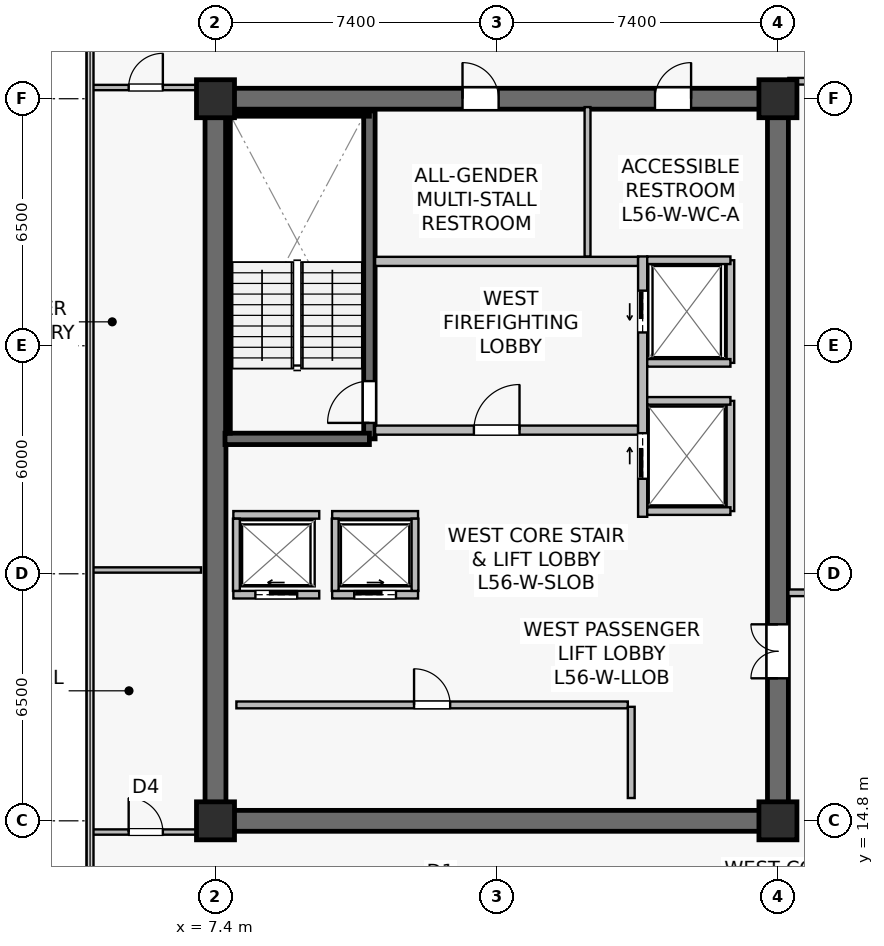
"""IFC4 building model, lengths in metres.
Left out: names, types, materials, properties, quantities, classifications, styles, units other than length and angle.
Written with IfcOpenShell. Run it as: python <this file> out.ifc"""

import sys

from ifc_helpers import new_model, si_unit, direction, frame, frame_2d, origin, origin_2d, place, context, subcontext, project, spatial, rectangle, extrude, source, transform, mapped, element, fill, save


model = new_model("IFC4")
c1 = context("Model", 3, precision=1e-05, world=origin(), true_north=direction((0.0, 1.0)))
c2 = subcontext(c1, "Body", "Model", "MODEL_VIEW")
j1 = project(units=[si_unit("LENGTHUNIT", "METRE"), si_unit("PLANEANGLEUNIT", "RADIAN")], contexts=[c1])
p1 = place(None, origin())
s1 = spatial("IfcSite", under=j1, at=p1, CompositionType="ELEMENT")
p2 = place(p1, origin())
s2 = spatial("IfcBuilding", under=s1, at=p2, CompositionType="ELEMENT")
p3 = place(p2, frame((0.0, 0.0, 234.2)))
s3 = spatial("IfcBuildingStorey", under=s2, at=p3, CompositionType="ELEMENT", Elevation=234.2)
p4 = place(p3, frame((7.125, 14.8, 0.0), z_axis=(0.0, 0.0, 1.0), x_axis=(1.0, 0.0, 0.0)))
e1 = element("IfcWall", 1, at=p4, inside=s3, PredefinedType="SHEAR", context=c2, shape_type="SweptSolid", body=[
    extrude(rectangle(XDim=15.35, YDim=0.55, at=frame_2d((7.675, 0.0))), origin(), (0.0, 0.0, 1.0), 3.8),
])
p5 = place(p3, frame((7.125, 33.8, 0.0), z_axis=(0.0, 0.0, 1.0), x_axis=(1.0, 0.0, 0.0)))
e2 = element("IfcWall", 2, at=p5, inside=s3, PredefinedType="SHEAR", context=c2, shape_type="SweptSolid", body=[
    extrude(rectangle(XDim=15.35, YDim=0.55, at=frame_2d((7.675, 0.0))), origin(), (0.0, 0.0, 1.0), 3.8),
])
p6 = place(p5, frame((6.775, 0.0, 0.0)))
e3 = element("IfcOpeningElement", 3, at=p6, cuts=e2, PredefinedType="OPENING", context=c2, shape_type="SweptSolid", body=[
    extrude(rectangle(XDim=0.95, YDim=2.15, at=frame_2d((0.475, 1.075))), frame((0.0, 0.285, 0.0), z_axis=(0.0, -1.0, 0.0), x_axis=(1.0, 0.0, 0.0)), (0.0, 0.0, 1.0), 0.57),
])
p7 = place(p5, frame((11.84, 0.0, 0.0)))
e4 = element("IfcOpeningElement", 4, at=p7, cuts=e2, PredefinedType="OPENING", context=c2, shape_type="SweptSolid", body=[
    extrude(rectangle(XDim=0.95, YDim=2.15, at=frame_2d((0.475, 1.075))), frame((0.0, 0.285, 0.0), z_axis=(0.0, -1.0, 0.0), x_axis=(1.0, 0.0, 0.0)), (0.0, 0.0, 1.0), 0.57),
])
p8 = place(p3, frame((7.4, 15.075, 0.0), z_axis=(0.0, 0.0, 1.0), x_axis=(0.0, 1.0, 0.0)))
e5 = element("IfcWall", 5, at=p8, inside=s3, PredefinedType="SHEAR", context=c2, shape_type="SweptSolid", body=[
    extrude(rectangle(XDim=18.45, YDim=0.55, at=frame_2d((9.225, 0.0))), origin(), (0.0, 0.0, 1.0), 3.8),
])
p9 = place(p3, frame((22.2, 15.075, 0.0), z_axis=(0.0, 0.0, 1.0), x_axis=(0.0, 1.0, 0.0)))
e6 = element("IfcWall", 6, at=p9, inside=s3, PredefinedType="SHEAR", context=c2, shape_type="SweptSolid", body=[
    extrude(rectangle(XDim=18.45, YDim=0.55, at=frame_2d((9.225, 0.0))), origin(), (0.0, 0.0, 1.0), 3.8),
])
p10 = place(p9, frame((3.475, 0.0, 0.0)))
e7 = element("IfcOpeningElement", 7, at=p10, cuts=e6, PredefinedType="OPENING", context=c2, shape_type="SweptSolid", body=[
    extrude(rectangle(XDim=1.42, YDim=2.2, at=frame_2d((0.71, 1.1))), frame((0.0, 0.285, 0.0), z_axis=(0.0, -1.0, 0.0), x_axis=(1.0, 0.0, 0.0)), (0.0, 0.0, 1.0), 0.57),
])
p11 = place(p3, frame((11.45, 24.85, 0.0), z_axis=(0.0, 0.0, 1.0), x_axis=(0.0, 1.0, 0.0)))
e8 = element("IfcWall", 8, at=p11, inside=s3, PredefinedType="SHEAR", context=c2, shape_type="SweptSolid", body=[
    extrude(rectangle(XDim=8.63, YDim=0.3, at=frame_2d((4.315, 0.0))), origin(), (0.0, 0.0, 1.0), 3.8),
])
p12 = place(p11, frame((0.42, 0.0, 0.0)))
e9 = element("IfcOpeningElement", 9, at=p12, cuts=e8, PredefinedType="OPENING", context=c2, shape_type="SweptSolid", body=[
    extrude(rectangle(XDim=1.1, YDim=2.15, at=frame_2d((0.55, 1.075))), frame((0.0, 0.16, 0.0), z_axis=(0.0, -1.0, 0.0), x_axis=(1.0, 0.0, 0.0)), (0.0, 0.0, 1.0), 0.32),
])
p13 = place(p3, frame((7.65, 24.85, 0.0), z_axis=(0.0, 0.0, 1.0), x_axis=(1.0, 0.0, 0.0)))
e10 = element("IfcWall", 10, at=p13, inside=s3, PredefinedType="SHEAR", context=c2, shape_type="SweptSolid", body=[
    extrude(rectangle(XDim=3.8, YDim=0.3, at=frame_2d((1.9, 0.0))), origin(), (0.0, 0.0, 1.0), 3.8),
])
p14 = place(p3, frame((7.73, 33.4, 0.0), z_axis=(0.0, 0.0, 1.0), x_axis=(1.0, 0.0, 0.0)))
e11 = element("IfcWall", 11, at=p14, inside=s3, PredefinedType="SOLIDWALL", context=c2, shape_type="SweptSolid", body=[
    extrude(rectangle(XDim=3.72, YDim=0.12, at=frame_2d((1.86, 0.0))), origin(), (0.0, 0.0, 1.0), 3.8),
])
p15 = place(p3, frame((7.73, 25.0, 0.0), z_axis=(0.0, 0.0, 1.0), x_axis=(0.0, 1.0, 0.0)))
e12 = element("IfcWall", 12, at=p15, inside=s3, PredefinedType="SOLIDWALL", context=c2, shape_type="SweptSolid", body=[
    extrude(rectangle(XDim=8.32, YDim=0.12, at=frame_2d((4.16, 0.0))), origin(), (0.0, 0.0, 1.0), 3.8),
])
m1 = source(origin(), c2, "Body", "SweptSolid", [
    extrude(rectangle(XDim=1.0, YDim=1.0, at=origin_2d()), origin(), (0.0, 0.0, 1.0), 4.1),
])
for number, where, z_axis, x_axis in (
    (13, (7.4, 14.8, 0.0), (0.0, 0.0, 1.0), (1.0, 0.0, 0.0)),
    (14, (22.2, 14.8, 0.0), (0.0, 0.0, 1.0), (1.0, 0.0, 0.0)),
    (15, (7.4, 33.8, 0.0), (0.0, 0.0, 1.0), (1.0, 0.0, 0.0)),
    (16, (22.2, 33.8, 0.0), (0.0, 0.0, 1.0), (1.0, 0.0, 0.0)),
):
    element("IfcColumn", number, at=place(p3, frame(where, z_axis=z_axis, x_axis=x_axis)), inside=s3, PredefinedType="COLUMN", context=c2, shape_type="MappedRepresentation", body=[
        mapped(m1, transform((0.0, 0.0, 0.0), scale=1.0)),
    ])
p16 = place(p3, frame((11.6, 25.08, 0.0), z_axis=(0.0, 0.0, 1.0), x_axis=(1.0, 0.0, 0.0)))
e17 = element("IfcWall", 17, at=p16, inside=s3, PredefinedType="SOLIDWALL", context=c2, shape_type="SweptSolid", body=[
    extrude(rectangle(XDim=6.92, YDim=0.24, at=frame_2d((3.46, 0.0))), origin(), (0.0, 0.0, 1.0), 3.197),
])
p17 = place(p16, frame((2.6, 0.0, 0.0)))
e18 = element("IfcOpeningElement", 18, at=p17, cuts=e17, PredefinedType="OPENING", context=c2, shape_type="SweptSolid", body=[
    extrude(rectangle(XDim=1.2, YDim=2.16, at=frame_2d((0.6, 1.08))), frame((0.0, 0.13, 0.0), z_axis=(0.0, -1.0, 0.0), x_axis=(1.0, 0.0, 0.0)), (0.0, 0.0, 1.0), 0.26),
])
p18 = place(p3, frame((11.6, 29.52, 0.0), z_axis=(0.0, 0.0, 1.0), x_axis=(1.0, 0.0, 0.0)))
e19 = element("IfcWall", 19, at=p18, inside=s3, PredefinedType="SOLIDWALL", context=c2, shape_type="SweptSolid", body=[
    extrude(rectangle(XDim=6.92, YDim=0.24, at=frame_2d((3.46, 0.0))), origin(), (0.0, 0.0, 1.0), 3.197),
])
p19 = place(p3, frame((18.64, 22.8, 0.0), z_axis=(0.0, 0.0, 1.0), x_axis=(0.0, 1.0, 0.0)))
e20 = element("IfcWall", 20, at=p19, inside=s3, PredefinedType="SOLIDWALL", context=c2, shape_type="SweptSolid", body=[
    extrude(rectangle(XDim=6.85, YDim=0.24, at=frame_2d((3.425, 0.0))), origin(), (0.0, 0.0, 1.0), 2.935),
])
p20 = place(p19, frame((4.85, 0.0, 0.0)))
e21 = element("IfcOpeningElement", 21, at=p20, cuts=e20, PredefinedType="OPENING", context=c2, shape_type="SweptSolid", body=[
    extrude(rectangle(XDim=1.1, YDim=2.22, at=frame_2d((0.55, 1.11))), frame((0.0, 0.13, 0.0), z_axis=(0.0, -1.0, 0.0), x_axis=(1.0, 0.0, 0.0)), (0.0, 0.0, 1.0), 0.26),
])
p21 = place(p19, frame((1.0, 0.0, 0.0)))
e22 = element("IfcOpeningElement", 22, at=p21, cuts=e20, PredefinedType="OPENING", context=c2, shape_type="SweptSolid", body=[
    extrude(rectangle(XDim=1.2, YDim=2.22, at=frame_2d((0.6, 1.11))), frame((0.0, 0.13, 0.0), z_axis=(0.0, -1.0, 0.0), x_axis=(1.0, 0.0, 0.0)), (0.0, 0.0, 1.0), 0.26),
])
p22 = place(p3, frame((7.87, 20.75, 0.0), z_axis=(0.0, 0.0, 1.0), x_axis=(1.0, 0.0, 0.0)))
e23 = element("IfcWall", 23, at=p22, inside=s3, PredefinedType="SOLIDWALL", context=c2, shape_type="SweptSolid", body=[
    extrude(rectangle(XDim=2.26, YDim=0.2, at=frame_2d((1.13, 0.0))), origin(), (0.0, 0.0, 1.0), 3.8),
])
p23 = place(p22, frame((0.58, 0.0, 0.0)))
e24 = element("IfcOpeningElement", 24, at=p23, cuts=e23, PredefinedType="OPENING", context=c2, shape_type="SweptSolid", body=[
    extrude(rectangle(XDim=1.1, YDim=2.22, at=frame_2d((0.55, 1.11))), frame((0.0, 0.11, 0.0), z_axis=(0.0, -1.0, 0.0), x_axis=(1.0, 0.0, 0.0)), (0.0, 0.0, 1.0), 0.22),
])
p24 = place(p3, frame((7.87, 22.85, 0.0), z_axis=(0.0, 0.0, 1.0), x_axis=(1.0, 0.0, 0.0)))
e25 = element("IfcWall", 25, at=p24, inside=s3, PredefinedType="SOLIDWALL", context=c2, shape_type="SweptSolid", body=[
    extrude(rectangle(XDim=2.26, YDim=0.2, at=frame_2d((1.13, 0.0))), origin(), (0.0, 0.0, 1.0), 3.8),
])
p25 = place(p3, frame((7.95, 20.85, 0.0), z_axis=(0.0, 0.0, 1.0), x_axis=(0.0, 1.0, 0.0)))
e26 = element("IfcWall", 26, at=p25, inside=s3, PredefinedType="SOLIDWALL", context=c2, shape_type="SweptSolid", body=[
    extrude(rectangle(XDim=1.9, YDim=0.18, at=frame_2d((0.95, 0.0))), origin(), (0.0, 0.0, 1.0), 3.8),
])
p26 = place(p3, frame((10.47, 20.75, 0.0), z_axis=(0.0, 0.0, 1.0), x_axis=(1.0, 0.0, 0.0)))
e27 = element("IfcWall", 27, at=p26, inside=s3, PredefinedType="SOLIDWALL", context=c2, shape_type="SweptSolid", body=[
    extrude(rectangle(XDim=2.26, YDim=0.2, at=frame_2d((1.13, 0.0))), origin(), (0.0, 0.0, 1.0), 3.8),
])
p27 = place(p26, frame((0.58, 0.0, 0.0)))
e28 = element("IfcOpeningElement", 28, at=p27, cuts=e27, PredefinedType="OPENING", context=c2, shape_type="SweptSolid", body=[
    extrude(rectangle(XDim=1.1, YDim=2.22, at=frame_2d((0.55, 1.11))), frame((0.0, 0.11, 0.0), z_axis=(0.0, -1.0, 0.0), x_axis=(1.0, 0.0, 0.0)), (0.0, 0.0, 1.0), 0.22),
])
p28 = place(p3, frame((10.47, 22.85, 0.0), z_axis=(0.0, 0.0, 1.0), x_axis=(1.0, 0.0, 0.0)))
e29 = element("IfcWall", 29, at=p28, inside=s3, PredefinedType="SOLIDWALL", context=c2, shape_type="SweptSolid", body=[
    extrude(rectangle(XDim=2.26, YDim=0.2, at=frame_2d((1.13, 0.0))), origin(), (0.0, 0.0, 1.0), 3.8),
])
for number, where, z_axis, x_axis in (
    (30, (10.55, 20.85, 0.0), (0.0, 0.0, 1.0), (0.0, 1.0, 0.0)),
    (31, (12.65, 20.85, 0.0), (0.0, 0.0, 1.0), (0.0, 1.0, 0.0)),
):
    element("IfcWall", number, at=place(p3, frame(where, z_axis=z_axis, x_axis=x_axis)), inside=s3, PredefinedType="SOLIDWALL", context=c2, shape_type="SweptSolid", body=[
        extrude(rectangle(XDim=1.9, YDim=0.18, at=frame_2d((0.95, 0.0))), origin(), (0.0, 0.0, 1.0), 3.8),
    ])
p29 = place(p3, frame((20.95, 26.85, 0.0), z_axis=(0.0, 0.0, 1.0), x_axis=(0.0, 1.0, 0.0)))
e32 = element("IfcWall", 32, at=p29, inside=s3, PredefinedType="SOLIDWALL", context=c2, shape_type="SweptSolid", body=[
    extrude(rectangle(XDim=2.7, YDim=0.2, at=frame_2d((1.35, 0.0))), origin(), (0.0, 0.0, 1.0), 3.8),
])
p30 = place(p3, frame((18.76, 29.55, 0.0), z_axis=(0.0, 0.0, 1.0), x_axis=(1.0, 0.0, 0.0)))
e33 = element("IfcWall", 33, at=p30, inside=s3, PredefinedType="SOLIDWALL", context=c2, shape_type="SweptSolid", body=[
    extrude(rectangle(XDim=2.19, YDim=0.2, at=frame_2d((1.095, 0.0))), origin(), (0.0, 0.0, 1.0), 3.8),
])
p31 = place(p3, frame((18.76, 26.85, 0.0), z_axis=(0.0, 0.0, 1.0), x_axis=(1.0, 0.0, 0.0)))
e34 = element("IfcWall", 34, at=p31, inside=s3, PredefinedType="SOLIDWALL", context=c2, shape_type="SweptSolid", body=[
    extrude(rectangle(XDim=2.19, YDim=0.2, at=frame_2d((1.095, 0.0))), origin(), (0.0, 0.0, 1.0), 3.197),
])
p32 = place(p3, frame((20.95, 22.95, 0.0), z_axis=(0.0, 0.0, 1.0), x_axis=(0.0, 1.0, 0.0)))
e35 = element("IfcWall", 35, at=p32, inside=s3, PredefinedType="SOLIDWALL", context=c2, shape_type="SweptSolid", body=[
    extrude(rectangle(XDim=2.9, YDim=0.2, at=frame_2d((1.45, 0.0))), origin(), (0.0, 0.0, 1.0), 2.935),
])
for number, where, z_axis, x_axis in (
    (36, (18.76, 25.85, 0.0), (0.0, 0.0, 1.0), (1.0, 0.0, 0.0)),
    (37, (18.76, 22.95, 0.0), (0.0, 0.0, 1.0), (1.0, 0.0, 0.0)),
):
    element("IfcWall", number, at=place(p3, frame(where, z_axis=z_axis, x_axis=x_axis)), inside=s3, PredefinedType="SOLIDWALL", context=c2, shape_type="SweptSolid", body=[
        extrude(rectangle(XDim=2.19, YDim=0.2, at=frame_2d((1.095, 0.0))), origin(), (0.0, 0.0, 1.0), 3.8),
    ])
p33 = place(p3, frame((7.95, 17.85, 0.0), z_axis=(0.0, 0.0, 1.0), x_axis=(1.0, 0.0, 0.0)))
e38 = element("IfcWall", 38, at=p33, inside=s3, PredefinedType="SOLIDWALL", context=c2, shape_type="SweptSolid", body=[
    extrude(rectangle(XDim=10.3, YDim=0.18, at=frame_2d((5.15, 0.0))), origin(), (0.0, 0.0, 1.0), 3.197),
])
p34 = place(p33, frame((4.675, 0.0, 0.0)))
e39 = element("IfcOpeningElement", 39, at=p34, cuts=e38, PredefinedType="OPENING", context=c2, shape_type="SweptSolid", body=[
    extrude(rectangle(XDim=0.95, YDim=2.15, at=frame_2d((0.475, 1.075))), frame((0.0, 0.1, 0.0), z_axis=(0.0, -1.0, 0.0), x_axis=(1.0, 0.0, 0.0)), (0.0, 0.0, 1.0), 0.2),
])
p35 = place(p3, frame((18.34, 15.4, 0.0), z_axis=(0.0, 0.0, 1.0), x_axis=(0.0, 1.0, 0.0)))
e40 = element("IfcWall", 40, at=p35, inside=s3, PredefinedType="SOLIDWALL", context=c2, shape_type="SweptSolid", body=[
    extrude(rectangle(XDim=2.4, YDim=0.18, at=frame_2d((1.2, 0.0))), origin(), (0.0, 0.0, 1.0), 3.8),
])
p36 = place(p3, frame((17.19, 29.65, 0.0), z_axis=(0.0, 0.0, 1.0), x_axis=(0.0, 1.0, 0.0)))
e41 = element("IfcWall", 41, at=p36, inside=s3, PredefinedType="PLUMBINGWALL", context=c2, shape_type="SweptSolid", body=[
    extrude(rectangle(XDim=3.93, YDim=0.155, at=frame_2d((1.965, 0.0))), origin(), (0.0, 0.0, 1.0), 3.8),
])
p37 = place(p3, frame((22.475, 34.26, 0.0), z_axis=(0.0, 0.0, 1.0), x_axis=(1.0, 0.0, 0.0)))
e42 = element("IfcWall", 42, at=p37, inside=s3, PredefinedType="PARTITIONING", context=c2, shape_type="SweptSolid", body=[
    extrude(rectangle(XDim=4.025, YDim=0.175, at=frame_2d((2.012, 0.0))), origin(), (0.0, 0.0, 1.0), 3.485),
])
p38 = place(p3, frame((22.475, 20.8, 0.0), z_axis=(0.0, 0.0, 1.0), x_axis=(1.0, 0.0, 0.0)))
e43 = element("IfcWall", 43, at=p38, inside=s3, PredefinedType="PARTITIONING", context=c2, shape_type="SweptSolid", body=[
    extrude(rectangle(XDim=4.025, YDim=0.175, at=frame_2d((2.012, 0.0))), origin(), (0.0, 0.0, 1.0), 3.8),
])
p39 = place(p38, frame((1.35, 0.0, 0.0)))
e44 = element("IfcOpeningElement", 44, at=p39, cuts=e43, PredefinedType="OPENING", context=c2, shape_type="SweptSolid", body=[
    extrude(rectangle(XDim=0.95, YDim=2.15, at=frame_2d((0.475, 1.075))), frame((0.0, 0.098, 0.0), z_axis=(0.0, -1.0, 0.0), x_axis=(1.0, 0.0, 0.0)), (0.0, 0.0, 1.0), 0.195),
])
p40 = place(p3, frame((4.11, 21.4, 0.0), z_axis=(0.0, 0.0, 1.0), x_axis=(1.0, 0.0, 0.0)))
e45 = element("IfcWall", 45, at=p40, inside=s3, PredefinedType="PARTITIONING", context=c2, shape_type="SweptSolid", body=[
    extrude(rectangle(XDim=2.91, YDim=0.14, at=frame_2d((1.455, 0.0))), origin(), (0.0, 0.0, 1.0), 3.8),
])
p41 = place(p3, frame((4.11, 14.505, 0.0), z_axis=(0.0, 0.0, 1.0), x_axis=(1.0, 0.0, 0.0)))
e46 = element("IfcWall", 46, at=p41, inside=s3, PredefinedType="PARTITIONING", context=c2, shape_type="SweptSolid", body=[
    extrude(rectangle(XDim=2.91, YDim=0.14, at=frame_2d((1.455, 0.0))), origin(), (0.0, 0.0, 1.0), 3.8),
])
p42 = place(p41, frame((1.005, 0.0, 0.0)))
e47 = element("IfcOpeningElement", 47, at=p42, cuts=e46, PredefinedType="OPENING", context=c2, shape_type="SweptSolid", body=[
    extrude(rectangle(XDim=0.9, YDim=2.1, at=frame_2d((0.45, 1.05))), frame((0.0, 0.08, 0.0), z_axis=(0.0, -1.0, 0.0), x_axis=(1.0, 0.0, 0.0)), (0.0, 0.0, 1.0), 0.16),
])
p43 = place(p3, frame((4.11, 34.095, 0.0), z_axis=(0.0, 0.0, 1.0), x_axis=(1.0, 0.0, 0.0)))
e48 = element("IfcWall", 48, at=p43, inside=s3, PredefinedType="PARTITIONING", context=c2, shape_type="SweptSolid", body=[
    extrude(rectangle(XDim=2.91, YDim=0.14, at=frame_2d((1.455, 0.0))), origin(), (0.0, 0.0, 1.0), 3.8),
])
p44 = place(p43, frame((1.005, 0.0, 0.0)))
e49 = element("IfcOpeningElement", 49, at=p44, cuts=e48, PredefinedType="OPENING", context=c2, shape_type="SweptSolid", body=[
    extrude(rectangle(XDim=0.9, YDim=2.1, at=frame_2d((0.45, 1.05))), frame((0.0, 0.08, 0.0), z_axis=(0.0, -1.0, 0.0), x_axis=(1.0, 0.0, 0.0)), (0.0, 0.0, 1.0), 0.16),
])
m2 = source(origin(), c2, "Body", "SweptSolid", [
    extrude(rectangle(XDim=1.1, YDim=2.15, at=frame_2d((0.55, 1.075))), frame((0.0, 0.025, 0.0), z_axis=(0.0, -1.0, 0.0), x_axis=(1.0, 0.0, 0.0)), (0.0, 0.0, 1.0), 0.05),
])
p45 = place(p12, origin())
e50 = element("IfcDoor", 50, at=p45, inside=s3, OperationType="SINGLE_SWING_LEFT", PredefinedType="DOOR", context=c2, shape_type="MappedRepresentation", body=[
    mapped(m2, transform((0.0, 0.0, 0.0), scale=1.0)),
])
fill(e9, e50)
m3 = source(origin(), c2, "Body", "SweptSolid", [
    extrude(rectangle(XDim=1.2, YDim=2.16, at=frame_2d((0.6, 1.08))), frame((0.0, 0.025, 0.0), z_axis=(0.0, -1.0, 0.0), x_axis=(1.0, 0.0, 0.0)), (0.0, 0.0, 1.0), 0.05),
])
p46 = place(p17, origin())
e51 = element("IfcDoor", 51, at=p46, inside=s3, OperationType="SINGLE_SWING_RIGHT", PredefinedType="DOOR", context=c2, shape_type="MappedRepresentation", body=[
    mapped(m3, transform((0.0, 0.0, 0.0), scale=1.0)),
])
fill(e18, e51)
m4 = source(origin(), c2, "Body", "SweptSolid", [
    extrude(rectangle(XDim=1.1, YDim=2.22, at=frame_2d((0.55, 1.11))), frame((0.0, 0.025, 0.0), z_axis=(0.0, -1.0, 0.0), x_axis=(1.0, 0.0, 0.0)), (0.0, 0.0, 1.0), 0.05),
])
p47 = place(p23, origin())
e52 = element("IfcDoor", 52, at=p47, inside=s3, OperationType="SLIDING_TO_LEFT", PredefinedType="USERDEFINED", context=c2, shape_type="MappedRepresentation", body=[
    mapped(m4, transform((0.0, 0.0, 0.0), scale=1.0)),
])
fill(e24, e52)
p48 = place(p27, origin())
e53 = element("IfcDoor", 53, at=p48, inside=s3, OperationType="SLIDING_TO_RIGHT", PredefinedType="USERDEFINED", context=c2, shape_type="MappedRepresentation", body=[
    mapped(m4, transform((0.0, 0.0, 0.0), scale=1.0)),
])
fill(e28, e53)
p49 = place(p20, origin())
e54 = element("IfcDoor", 54, at=p49, inside=s3, OperationType="SLIDING_TO_LEFT", PredefinedType="USERDEFINED", context=c2, shape_type="MappedRepresentation", body=[
    mapped(m4, transform((0.0, 0.0, 0.0), scale=1.0)),
])
fill(e21, e54)
m5 = source(origin(), c2, "Body", "SweptSolid", [
    extrude(rectangle(XDim=1.2, YDim=2.22, at=frame_2d((0.6, 1.11))), frame((0.0, 0.025, 0.0), z_axis=(0.0, -1.0, 0.0), x_axis=(1.0, 0.0, 0.0)), (0.0, 0.0, 1.0), 0.05),
])
p50 = place(p21, origin())
e55 = element("IfcDoor", 55, at=p50, inside=s3, OperationType="SLIDING_TO_RIGHT", PredefinedType="USERDEFINED", context=c2, shape_type="MappedRepresentation", body=[
    mapped(m5, transform((0.0, 0.0, 0.0), scale=1.0)),
])
fill(e22, e55)
m6 = source(origin(), c2, "Body", "SweptSolid", [
    extrude(rectangle(XDim=0.95, YDim=2.15, at=frame_2d((0.475, 1.075))), frame((0.0, 0.025, 0.0), z_axis=(0.0, -1.0, 0.0), x_axis=(1.0, 0.0, 0.0)), (0.0, 0.0, 1.0), 0.05),
])
p51 = place(p34, origin())
e56 = element("IfcDoor", 56, at=p51, inside=s3, OperationType="SINGLE_SWING_LEFT", PredefinedType="DOOR", context=c2, shape_type="MappedRepresentation", body=[
    mapped(m6, transform((0.0, 0.0, 0.0), scale=1.0)),
])
fill(e39, e56)
m7 = source(origin(), c2, "Body", "SweptSolid", [
    extrude(rectangle(XDim=1.42, YDim=2.2, at=frame_2d((0.71, 1.1))), frame((0.0, 0.025, 0.0), z_axis=(0.0, -1.0, 0.0), x_axis=(1.0, 0.0, 0.0)), (0.0, 0.0, 1.0), 0.05),
])
p52 = place(p10, origin())
e57 = element("IfcDoor", 57, at=p52, inside=s3, OperationType="DOUBLE_DOOR_SINGLE_SWING", PredefinedType="DOOR", context=c2, shape_type="MappedRepresentation", body=[
    mapped(m7, transform((0.0, 0.0, 0.0), scale=1.0)),
])
fill(e7, e57)
p53 = place(p6, origin())
e58 = element("IfcDoor", 58, at=p53, inside=s3, OperationType="SINGLE_SWING_LEFT", PredefinedType="DOOR", context=c2, shape_type="MappedRepresentation", body=[
    mapped(m6, transform((0.0, 0.0, 0.0), scale=1.0)),
])
fill(e3, e58)
p54 = place(p7, origin())
e59 = element("IfcDoor", 59, at=p54, inside=s3, OperationType="SINGLE_SWING_RIGHT", PredefinedType="DOOR", context=c2, shape_type="MappedRepresentation", body=[
    mapped(m6, transform((0.0, 0.0, 0.0), scale=1.0)),
])
fill(e4, e59)
m8 = source(origin(), c2, "Body", "SweptSolid", [
    extrude(rectangle(XDim=0.9, YDim=2.1, at=frame_2d((0.45, 1.05))), frame((0.0, 0.025, 0.0), z_axis=(0.0, -1.0, 0.0), x_axis=(1.0, 0.0, 0.0)), (0.0, 0.0, 1.0), 0.05),
])
p55 = place(p42, origin())
e60 = element("IfcDoor", 60, at=p55, inside=s3, OperationType="SINGLE_SWING_LEFT", PredefinedType="DOOR", context=c2, shape_type="MappedRepresentation", body=[
    mapped(m8, transform((0.0, 0.0, 0.0), scale=1.0)),
])
fill(e47, e60)
p56 = place(p44, origin())
e61 = element("IfcDoor", 61, at=p56, inside=s3, OperationType="SINGLE_SWING_RIGHT", PredefinedType="DOOR", context=c2, shape_type="MappedRepresentation", body=[
    mapped(m8, transform((0.0, 0.0, 0.0), scale=1.0)),
])
fill(e49, e61)
save(model, sys.argv[1])
